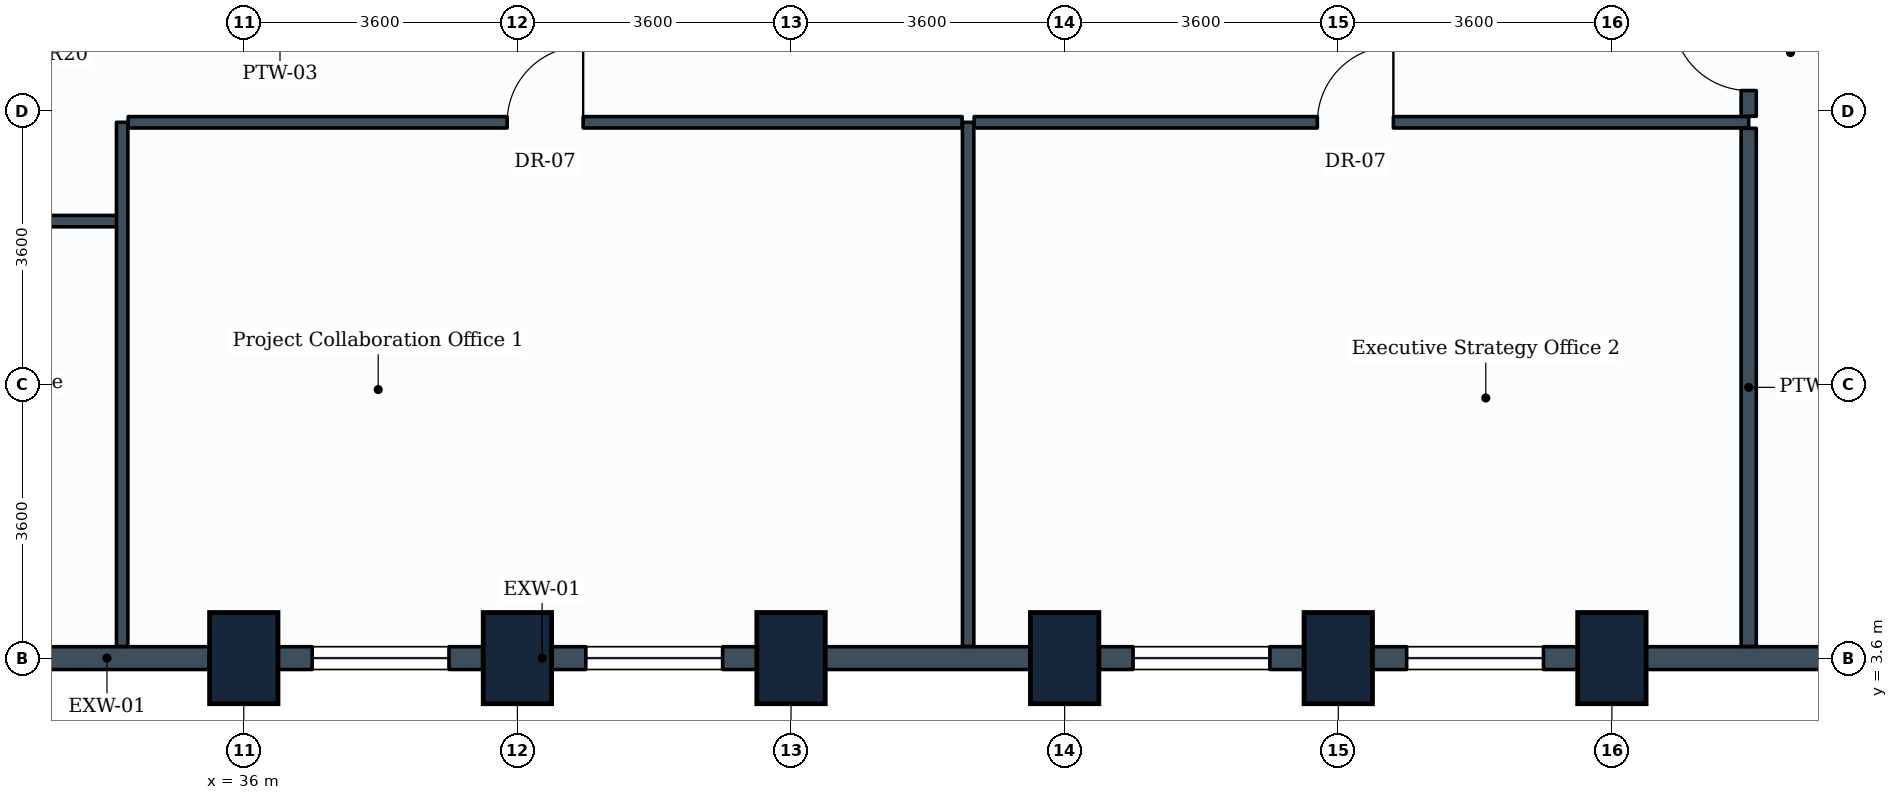
"""IFC4 building model, lengths in metres.
Left out: names, types, materials, properties, quantities, classifications, styles, units other than length and angle.
Written with IfcOpenShell. Run it as: python <this file> out.ifc"""

import sys

from ifc_helpers import new_model, si_unit, direction, frame, frame_2d, origin, origin_2d, place, context, subcontext, project, spatial, rectangle, extrude, element, fill, save


model = new_model("IFC4")
c1 = context("Model", 3, precision=1e-05, world=origin(), true_north=direction((0.0, 1.0)))
c2 = subcontext(c1, "Body", "Model", "MODEL_VIEW")
j1 = project(units=[si_unit("LENGTHUNIT", "METRE"), si_unit("PLANEANGLEUNIT", "RADIAN")], contexts=[c1])
p1 = place(None, origin())
s1 = spatial("IfcSite", under=j1, at=p1, CompositionType="ELEMENT")
p2 = place(p1, origin())
s2 = spatial("IfcBuilding", under=s1, at=p2, CompositionType="ELEMENT")
p3 = place(p2, frame((0.0, 0.0, 70.8)))
s3 = spatial("IfcBuildingStorey", under=s2, at=p3, CompositionType="ELEMENT", Elevation=70.8)
for number, where, z_axis, x_axis in (
    (1, (36.0, 3.6, 0.0), (0.0, 0.0, 1.0), (1.0, 0.0, 0.0)),
    (2, (39.6, 3.6, 0.0), (0.0, 0.0, 1.0), (1.0, 0.0, 0.0)),
    (3, (43.2, 3.6, 0.0), (0.0, 0.0, 1.0), (1.0, 0.0, 0.0)),
    (4, (46.8, 3.6, 0.0), (0.0, 0.0, 1.0), (1.0, 0.0, 0.0)),
    (5, (50.4, 3.6, 0.0), (0.0, 0.0, 1.0), (1.0, 0.0, 0.0)),
    (6, (54.0, 3.6, 0.0), (0.0, 0.0, 1.0), (1.0, 0.0, 0.0)),
):
    element("IfcColumn", number, at=place(p3, frame(where, z_axis=z_axis, x_axis=x_axis)), inside=s3, PredefinedType="COLUMN", context=c2, shape_type="SweptSolid", body=[
        extrude(rectangle(XDim=0.9, YDim=1.2, at=origin_2d()), origin(), (0.0, 0.0, 1.0), 3.9),
    ])
p4 = place(p3, frame((36.0, 3.6, 0.0), z_axis=(0.0, 0.0, 1.0), x_axis=(-1.0, 0.0, 0.0)))
e7 = element("IfcWall", 7, at=p4, inside=s3, PredefinedType="STANDARD", context=c2, shape_type="SweptSolid", body=[
    extrude(rectangle(XDim=3.6, YDim=0.3, at=frame_2d((1.8, 0.0))), origin(), (0.0, 0.0, 1.0), 2.93),
])
p5 = place(p3, frame((39.6, 3.6, 0.0), z_axis=(0.0, 0.0, 1.0), x_axis=(-1.0, 0.0, 0.0)))
e8 = element("IfcWall", 8, at=p5, inside=s3, PredefinedType="STANDARD", context=c2, shape_type="SweptSolid", body=[
    extrude(rectangle(XDim=3.6, YDim=0.3, at=frame_2d((1.8, 0.0))), origin(), (0.0, 0.0, 1.0), 2.93),
])
p6 = place(p5, frame((0.9, 0.0, 0.85)))
e9 = element("IfcOpeningElement", 9, at=p6, cuts=e8, PredefinedType="OPENING", context=c2, shape_type="SweptSolid", body=[
    extrude(rectangle(XDim=1.8, YDim=1.35, at=frame_2d((0.9, 0.675))), frame((0.0, 0.16, 0.0), z_axis=(0.0, -1.0, 0.0), x_axis=(1.0, 0.0, 0.0)), (0.0, 0.0, 1.0), 0.32),
])
p7 = place(p3, frame((43.2, 3.6, 0.0), z_axis=(0.0, 0.0, 1.0), x_axis=(-1.0, 0.0, 0.0)))
e10 = element("IfcWall", 10, at=p7, inside=s3, PredefinedType="STANDARD", context=c2, shape_type="SweptSolid", body=[
    extrude(rectangle(XDim=3.6, YDim=0.3, at=frame_2d((1.8, 0.0))), origin(), (0.0, 0.0, 1.0), 2.93),
])
p8 = place(p7, frame((0.9, 0.0, 0.85)))
e11 = element("IfcOpeningElement", 11, at=p8, cuts=e10, PredefinedType="OPENING", context=c2, shape_type="SweptSolid", body=[
    extrude(rectangle(XDim=1.8, YDim=1.35, at=frame_2d((0.9, 0.675))), frame((0.0, 0.16, 0.0), z_axis=(0.0, -1.0, 0.0), x_axis=(1.0, 0.0, 0.0)), (0.0, 0.0, 1.0), 0.32),
])
p9 = place(p3, frame((46.8, 3.6, 0.0), z_axis=(0.0, 0.0, 1.0), x_axis=(-1.0, 0.0, 0.0)))
e12 = element("IfcWall", 12, at=p9, inside=s3, PredefinedType="STANDARD", context=c2, shape_type="SweptSolid", body=[
    extrude(rectangle(XDim=3.6, YDim=0.3, at=frame_2d((1.8, 0.0))), origin(), (0.0, 0.0, 1.0), 2.93),
])
p10 = place(p3, frame((50.4, 3.6, 0.0), z_axis=(0.0, 0.0, 1.0), x_axis=(-1.0, 0.0, 0.0)))
e13 = element("IfcWall", 13, at=p10, inside=s3, PredefinedType="STANDARD", context=c2, shape_type="SweptSolid", body=[
    extrude(rectangle(XDim=3.6, YDim=0.3, at=frame_2d((1.8, 0.0))), origin(), (0.0, 0.0, 1.0), 2.93),
])
p11 = place(p10, frame((0.9, 0.0, 0.85)))
e14 = element("IfcOpeningElement", 14, at=p11, cuts=e13, PredefinedType="OPENING", context=c2, shape_type="SweptSolid", body=[
    extrude(rectangle(XDim=1.8, YDim=1.35, at=frame_2d((0.9, 0.675))), frame((0.0, 0.16, 0.0), z_axis=(0.0, -1.0, 0.0), x_axis=(1.0, 0.0, 0.0)), (0.0, 0.0, 1.0), 0.32),
])
p12 = place(p3, frame((54.0, 3.6, 0.0), z_axis=(0.0, 0.0, 1.0), x_axis=(-1.0, 0.0, 0.0)))
e15 = element("IfcWall", 15, at=p12, inside=s3, PredefinedType="STANDARD", context=c2, shape_type="SweptSolid", body=[
    extrude(rectangle(XDim=3.6, YDim=0.3, at=frame_2d((1.8, 0.0))), origin(), (0.0, 0.0, 1.0), 2.93),
])
p13 = place(p12, frame((0.9, 0.0, 0.85)))
e16 = element("IfcOpeningElement", 16, at=p13, cuts=e15, PredefinedType="OPENING", context=c2, shape_type="SweptSolid", body=[
    extrude(rectangle(XDim=1.8, YDim=1.35, at=frame_2d((0.9, 0.675))), frame((0.0, 0.16, 0.0), z_axis=(0.0, -1.0, 0.0), x_axis=(1.0, 0.0, 0.0)), (0.0, 0.0, 1.0), 0.32),
])
p14 = place(p3, frame((57.6, 3.6, 0.0), z_axis=(0.0, 0.0, 1.0), x_axis=(-1.0, 0.0, 0.0)))
e17 = element("IfcWall", 17, at=p14, inside=s3, PredefinedType="STANDARD", context=c2, shape_type="SweptSolid", body=[
    extrude(rectangle(XDim=3.6, YDim=0.3, at=frame_2d((1.8, 0.0))), origin(), (0.0, 0.0, 1.0), 2.93),
])
p15 = place(p3, frame((28.879, 9.35, 0.0), z_axis=(0.0, 0.0, 1.0), x_axis=(1.0, 0.0, 0.0)))
e18 = element("IfcWall", 18, at=p15, inside=s3, PredefinedType="PARTITIONING", context=c2, shape_type="SweptSolid", body=[
    extrude(rectangle(XDim=5.521, YDim=0.15, at=frame_2d((2.76, 0.0))), origin(), (0.0, 0.0, 1.0), 3.565),
])
p16 = place(p15, frame((0.36, 0.0, 0.0)))
e19 = element("IfcOpeningElement", 19, at=p16, cuts=e18, PredefinedType="OPENING", context=c2, shape_type="SweptSolid", body=[
    extrude(rectangle(XDim=1.0, YDim=2.1, at=frame_2d((0.5, 1.05))), frame((0.0, 0.085, 0.0), z_axis=(0.0, -1.0, 0.0), x_axis=(1.0, 0.0, 0.0)), (0.0, 0.0, 1.0), 0.17),
])
for number, where, z_axis, x_axis in (
    (20, (34.4, 3.754, 0.0), (0.0, 0.0, 1.0), (0.0, 1.0, 0.0)),
    (21, (45.53, 3.754, 0.0), (0.0, 0.0, 1.0), (0.0, 1.0, 0.0)),
):
    element("IfcWall", number, at=place(p3, frame(where, z_axis=z_axis, x_axis=x_axis)), inside=s3, PredefinedType="PARTITIONING", context=c2, shape_type="SweptSolid", body=[
        extrude(rectangle(XDim=6.896, YDim=0.15, at=frame_2d((3.448, 0.0))), origin(), (0.0, 0.0, 1.0), 2.93),
    ])
p17 = place(p3, frame((34.479, 10.65, 0.0), z_axis=(0.0, 0.0, 1.0), x_axis=(1.0, 0.0, 0.0)))
e22 = element("IfcWall", 22, at=p17, inside=s3, PredefinedType="PARTITIONING", context=c2, shape_type="SweptSolid", body=[
    extrude(rectangle(XDim=10.972, YDim=0.15, at=frame_2d((5.486, 0.0))), origin(), (0.0, 0.0, 1.0), 2.96),
])
p18 = place(p17, frame((4.986, 0.0, 0.0)))
e23 = element("IfcOpeningElement", 23, at=p18, cuts=e22, PredefinedType="OPENING", context=c2, shape_type="SweptSolid", body=[
    extrude(rectangle(XDim=1.0, YDim=2.1, at=frame_2d((0.5, 1.05))), frame((0.0, 0.085, 0.0), z_axis=(0.0, -1.0, 0.0), x_axis=(1.0, 0.0, 0.0)), (0.0, 0.0, 1.0), 0.17),
])
p19 = place(p3, frame((45.609, 10.65, 0.0), z_axis=(0.0, 0.0, 1.0), x_axis=(1.0, 0.0, 0.0)))
e24 = element("IfcWall", 24, at=p19, inside=s3, PredefinedType="PARTITIONING", context=c2, shape_type="SweptSolid", body=[
    extrude(rectangle(XDim=10.191, YDim=0.15, at=frame_2d((5.096, 0.0))), origin(), (0.0, 0.0, 1.0), 2.96),
])
p20 = place(p19, frame((4.516, 0.0, 0.0)))
e25 = element("IfcOpeningElement", 25, at=p20, cuts=e24, PredefinedType="OPENING", context=c2, shape_type="SweptSolid", body=[
    extrude(rectangle(XDim=1.0, YDim=2.1, at=frame_2d((0.5, 1.05))), frame((0.0, 0.085, 0.0), z_axis=(0.0, -1.0, 0.0), x_axis=(1.0, 0.0, 0.0)), (0.0, 0.0, 1.0), 0.17),
])
p21 = place(p3, frame((55.8, 3.754, 0.0), z_axis=(0.0, 0.0, 1.0), x_axis=(0.0, 1.0, 0.0)))
e26 = element("IfcWall", 26, at=p21, inside=s3, PredefinedType="PARTITIONING", context=c2, shape_type="SweptSolid", body=[
    extrude(rectangle(XDim=6.817, YDim=0.2, at=frame_2d((3.409, 0.0))), origin(), (0.0, 0.0, 1.0), 2.93),
])
p22 = place(p3, frame((55.8, 10.729, 0.0), z_axis=(0.0, 0.0, 1.0), x_axis=(0.0, 1.0, 0.0)))
e27 = element("IfcWall", 27, at=p22, inside=s3, PredefinedType="PARTITIONING", context=c2, shape_type="SweptSolid", body=[
    extrude(rectangle(XDim=1.692, YDim=0.2, at=frame_2d((0.846, 0.0))), origin(), (0.0, 0.0, 1.0), 3.565),
])
p23 = place(p22, frame((0.339, 0.0, 0.0)))
e28 = element("IfcOpeningElement", 28, at=p23, cuts=e27, PredefinedType="OPENING", context=c2, shape_type="SweptSolid", body=[
    extrude(rectangle(XDim=1.0, YDim=2.1, at=frame_2d((0.5, 1.05))), frame((0.0, 0.11, 0.0), z_axis=(0.0, -1.0, 0.0), x_axis=(1.0, 0.0, 0.0)), (0.0, 0.0, 1.0), 0.22),
])
p24 = place(p6, origin())
e29 = element("IfcWindow", 29, at=p24, inside=s3, PartitioningType="SINGLE_PANEL", PredefinedType="WINDOW", context=c2, shape_type="SweptSolid", body=[
    extrude(rectangle(XDim=1.8, YDim=1.35, at=frame_2d((0.9, 0.675))), frame((0.0, 0.03, 0.0), z_axis=(0.0, -1.0, 0.0), x_axis=(1.0, 0.0, 0.0)), (0.0, 0.0, 1.0), 0.06),
])
fill(e9, e29)
p25 = place(p8, origin())
e30 = element("IfcWindow", 30, at=p25, inside=s3, PartitioningType="SINGLE_PANEL", PredefinedType="WINDOW", context=c2, shape_type="SweptSolid", body=[
    extrude(rectangle(XDim=1.8, YDim=1.35, at=frame_2d((0.9, 0.675))), frame((0.0, 0.03, 0.0), z_axis=(0.0, -1.0, 0.0), x_axis=(1.0, 0.0, 0.0)), (0.0, 0.0, 1.0), 0.06),
])
fill(e11, e30)
p26 = place(p11, origin())
e31 = element("IfcWindow", 31, at=p26, inside=s3, PartitioningType="SINGLE_PANEL", PredefinedType="WINDOW", context=c2, shape_type="SweptSolid", body=[
    extrude(rectangle(XDim=1.8, YDim=1.35, at=frame_2d((0.9, 0.675))), frame((0.0, 0.03, 0.0), z_axis=(0.0, -1.0, 0.0), x_axis=(1.0, 0.0, 0.0)), (0.0, 0.0, 1.0), 0.06),
])
fill(e14, e31)
p27 = place(p13, origin())
e32 = element("IfcWindow", 32, at=p27, inside=s3, PartitioningType="SINGLE_PANEL", PredefinedType="WINDOW", context=c2, shape_type="SweptSolid", body=[
    extrude(rectangle(XDim=1.8, YDim=1.35, at=frame_2d((0.9, 0.675))), frame((0.0, 0.03, 0.0), z_axis=(0.0, -1.0, 0.0), x_axis=(1.0, 0.0, 0.0)), (0.0, 0.0, 1.0), 0.06),
])
fill(e16, e32)
p28 = place(p18, origin())
e33 = element("IfcDoor", 33, at=p28, inside=s3, OperationType="SINGLE_SWING_RIGHT", PredefinedType="DOOR", context=c2, shape_type="SweptSolid", body=[
    extrude(rectangle(XDim=1.0, YDim=2.1, at=frame_2d((0.5, 1.05))), frame((0.0, 0.025, 0.0), z_axis=(0.0, -1.0, 0.0), x_axis=(1.0, 0.0, 0.0)), (0.0, 0.0, 1.0), 0.05),
])
fill(e23, e33)
p29 = place(p20, origin())
e34 = element("IfcDoor", 34, at=p29, inside=s3, OperationType="SINGLE_SWING_RIGHT", PredefinedType="DOOR", context=c2, shape_type="SweptSolid", body=[
    extrude(rectangle(XDim=1.0, YDim=2.1, at=frame_2d((0.5, 1.05))), frame((0.0, 0.025, 0.0), z_axis=(0.0, -1.0, 0.0), x_axis=(1.0, 0.0, 0.0)), (0.0, 0.0, 1.0), 0.05),
])
fill(e25, e34)
p30 = place(p23, origin())
e35 = element("IfcDoor", 35, at=p30, inside=s3, OperationType="SINGLE_SWING_RIGHT", PredefinedType="DOOR", context=c2, shape_type="SweptSolid", body=[
    extrude(rectangle(XDim=1.0, YDim=2.1, at=frame_2d((0.5, 1.05))), frame((0.0, 0.025, 0.0), z_axis=(0.0, -1.0, 0.0), x_axis=(1.0, 0.0, 0.0)), (0.0, 0.0, 1.0), 0.05),
])
fill(e28, e35)
save(model, sys.argv[1])
